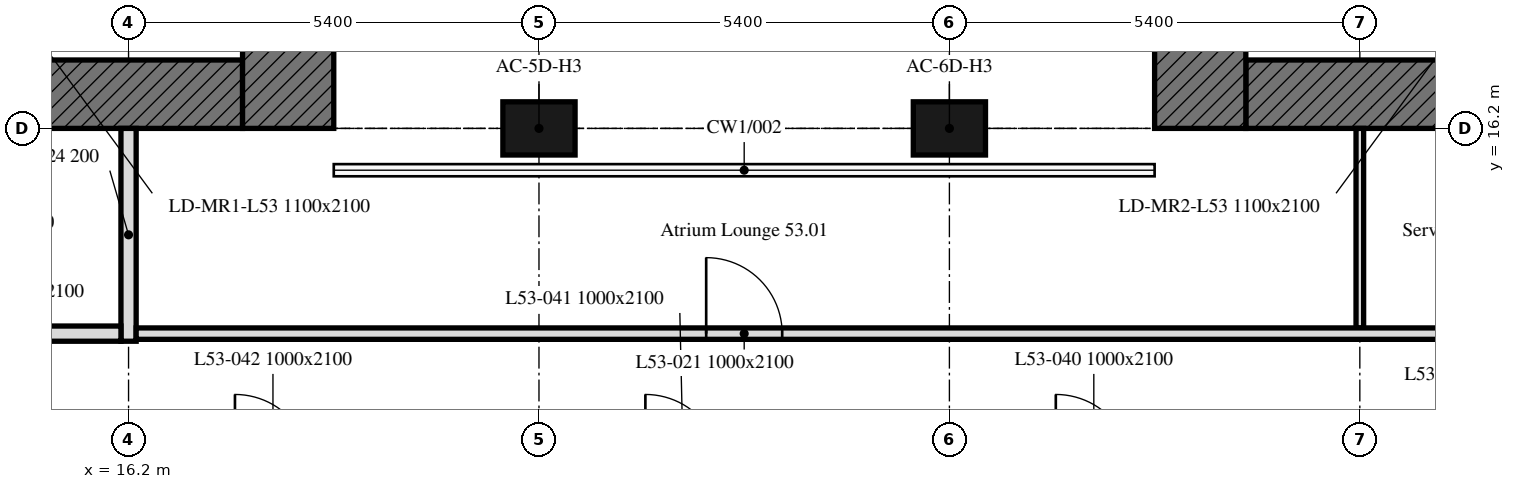
"""IFC4 building model, lengths in metres.
Left out: names, types, materials, properties, quantities, classifications, styles, units other than length and angle.
Written with IfcOpenShell. Run it as: python <this file> out.ifc"""

import sys

from ifc_helpers import new_model, si_unit, direction, frame, frame_2d, origin, origin_2d, place, context, subcontext, project, spatial, rectangle, extrude, element, fill, save


model = new_model("IFC4")
c1 = context("Model", 3, precision=1e-05, world=origin(), true_north=direction((0.0, 1.0)))
c2 = subcontext(c1, "Body", "Model", "MODEL_VIEW")
j1 = project(units=[si_unit("LENGTHUNIT", "METRE"), si_unit("PLANEANGLEUNIT", "RADIAN")], contexts=[c1])
p1 = place(None, origin())
s1 = spatial("IfcSite", under=j1, at=p1, CompositionType="ELEMENT")
p2 = place(p1, origin())
s2 = spatial("IfcBuilding", under=s1, at=p2, CompositionType="ELEMENT")
p3 = place(p2, frame((0.0, 0.0, 213.7)))
s3 = spatial("IfcBuildingStorey", under=s2, at=p3, CompositionType="ELEMENT", Elevation=213.7)
for number, where, z_axis, x_axis in (
    (1, (21.6, 16.2, 0.0), (0.0, 0.0, 1.0), (1.0, 0.0, 0.0)),
    (2, (27.0, 16.2, 0.0), (0.0, 0.0, 1.0), (1.0, 0.0, 0.0)),
):
    element("IfcColumn", number, at=place(p3, frame(where, z_axis=z_axis, x_axis=x_axis)), inside=s3, PredefinedType="COLUMN", context=c2, shape_type="SweptSolid", body=[
        extrude(rectangle(XDim=0.95, YDim=0.7, at=origin_2d()), origin(), (0.0, 0.0, 1.0), 3.0),
    ])
p4 = place(p3, frame((17.7, 16.65, 0.0), z_axis=(0.0, 0.0, 1.0), x_axis=(-1.0, 0.0, 0.0)))
e3 = element("IfcWall", 3, at=p4, inside=s3, PredefinedType="SOLIDWALL", context=c2, shape_type="SweptSolid", body=[
    extrude(rectangle(XDim=11.1, YDim=0.9, at=frame_2d((5.55, 0.0))), origin(), (0.0, 0.0, 1.0), 3.0),
])
p5 = place(p4, frame((5.55, 0.0, 0.0)))
e4 = element("IfcOpeningElement", 4, at=p5, cuts=e3, PredefinedType="OPENING", context=c2, shape_type="SweptSolid", body=[
    extrude(rectangle(XDim=2.0, YDim=2.4, at=frame_2d((1.0, 1.2))), frame((0.0, 0.45, 0.0), z_axis=(0.0, -1.0, 0.0), x_axis=(1.0, 0.0, 0.0)), (0.0, 0.0, 1.0), 0.9),
])
p6 = place(p3, frame((18.3, 32.4, 0.0), z_axis=(0.0, 0.0, 1.0), x_axis=(0.0, -1.0, 0.0)))
e5 = element("IfcWall", 5, at=p6, inside=s3, PredefinedType="SOLIDWALL", context=c2, shape_type="SweptSolid", body=[
    extrude(rectangle(XDim=16.2, YDim=1.2, at=frame_2d((8.1, 0.0))), origin(), (0.0, 0.0, 1.0), 3.0),
])
p7 = place(p3, frame((42.0, 16.65, 0.0), z_axis=(0.0, 0.0, 1.0), x_axis=(-1.0, 0.0, 0.0)))
e6 = element("IfcWall", 6, at=p7, inside=s3, PredefinedType="SOLIDWALL", context=c2, shape_type="SweptSolid", body=[
    extrude(rectangle(XDim=11.1, YDim=0.9, at=frame_2d((5.55, 0.0))), origin(), (0.0, 0.0, 1.0), 3.0),
])
p8 = place(p7, frame((3.55, 0.0, 0.0)))
e7 = element("IfcOpeningElement", 7, at=p8, cuts=e6, PredefinedType="OPENING", context=c2, shape_type="SweptSolid", body=[
    extrude(rectangle(XDim=2.0, YDim=2.4, at=frame_2d((1.0, 1.2))), frame((0.0, 0.45, 0.0), z_axis=(0.0, -1.0, 0.0), x_axis=(1.0, 0.0, 0.0)), (0.0, 0.0, 1.0), 0.9),
])
p9 = place(p3, frame((30.3, 16.2, 0.0), z_axis=(0.0, 0.0, 1.0), x_axis=(0.0, 1.0, 0.0)))
e8 = element("IfcWall", 8, at=p9, inside=s3, PredefinedType="SOLIDWALL", context=c2, shape_type="SweptSolid", body=[
    extrude(rectangle(XDim=16.2, YDim=1.2, at=frame_2d((8.1, 0.0))), origin(), (0.0, 0.0, 1.0), 3.0),
])
p10 = place(p3, frame((32.4, 13.575, 0.0), z_axis=(0.0, 0.0, 1.0), x_axis=(0.0, 1.0, 0.0)))
e9 = element("IfcWall", 9, at=p10, inside=s3, PredefinedType="PARTITIONING", context=c2, shape_type="SweptSolid", body=[
    extrude(rectangle(XDim=2.625, YDim=0.1, at=frame_2d((1.312, 0.0))), origin(), (0.0, 0.0, 1.0), 3.0),
])
p11 = place(p3, frame((16.2, 16.2, 0.0), z_axis=(0.0, 0.0, 1.0), x_axis=(0.0, -1.0, 0.0)))
e10 = element("IfcWall", 10, at=p11, inside=s3, PredefinedType="PARTITIONING", context=c2, shape_type="SweptSolid", body=[
    extrude(rectangle(XDim=2.8, YDim=0.2, at=frame_2d((1.4, 0.0))), origin(), (0.0, 0.0, 1.0), 3.0),
])
p12 = place(p3, frame((16.3, 13.5, 0.0), z_axis=(0.0, 0.0, 1.0), x_axis=(1.0, 0.0, 0.0)))
e11 = element("IfcWall", 11, at=p12, inside=s3, PredefinedType="PARTITIONING", context=c2, shape_type="SweptSolid", body=[
    extrude(rectangle(XDim=26.149, YDim=0.15, at=frame_2d((13.074, 0.0))), origin(), (0.0, 0.0, 1.0), 3.0),
])
p13 = place(p12, frame((7.5, 0.0, 0.0)))
e12 = element("IfcOpeningElement", 12, at=p13, cuts=e11, PredefinedType="OPENING", context=c2, shape_type="SweptSolid", body=[
    extrude(rectangle(XDim=1.0, YDim=2.1, at=frame_2d((0.5, 1.05))), frame((0.0, 0.075, 0.0), z_axis=(0.0, -1.0, 0.0), x_axis=(1.0, 0.0, 0.0)), (0.0, 0.0, 1.0), 0.15),
])
p14 = place(p12, frame((23.12, 0.0, 0.0)))
e13 = element("IfcOpeningElement", 13, at=p14, cuts=e11, PredefinedType="OPENING", context=c2, shape_type="SweptSolid", body=[
    extrude(rectangle(XDim=1.0, YDim=2.1, at=frame_2d((0.5, 1.05))), frame((0.0, 0.075, 0.0), z_axis=(0.0, -1.0, 0.0), x_axis=(1.0, 0.0, 0.0)), (0.0, 0.0, 1.0), 0.15),
])
p15 = place(p12, frame((17.225, 0.0, 0.0)))
e14 = element("IfcOpeningElement", 14, at=p15, cuts=e11, PredefinedType="OPENING", context=c2, shape_type="SweptSolid", body=[
    extrude(rectangle(XDim=1.0, YDim=2.1, at=frame_2d((0.5, 1.05))), frame((0.0, 0.075, 0.0), z_axis=(0.0, -1.0, 0.0), x_axis=(1.0, 0.0, 0.0)), (0.0, 0.0, 1.0), 0.15),
])
p16 = place(p12, frame((19.65, 0.0, 0.0)))
e15 = element("IfcOpeningElement", 15, at=p16, cuts=e11, PredefinedType="OPENING", context=c2, shape_type="SweptSolid", body=[
    extrude(rectangle(XDim=1.8, YDim=2.4, at=frame_2d((0.9, 1.2))), frame((0.0, 0.075, 0.0), z_axis=(0.0, -1.0, 0.0), x_axis=(1.0, 0.0, 0.0)), (0.0, 0.0, 1.0), 0.15),
])
p17 = place(p3, frame((16.1, 13.5, 0.0), z_axis=(0.0, 0.0, 1.0), x_axis=(-1.0, 0.0, 0.0)))
e16 = element("IfcWall", 16, at=p17, inside=s3, PredefinedType="PARTITIONING", context=c2, shape_type="SweptSolid", body=[
    extrude(rectangle(XDim=3.05, YDim=0.2, at=frame_2d((1.525, 0.0))), origin(), (0.0, 0.0, 1.0), 3.0),
])
p18 = place(p17, frame((1.025, 0.0, 0.0)))
e17 = element("IfcOpeningElement", 17, at=p18, cuts=e16, PredefinedType="OPENING", context=c2, shape_type="SweptSolid", body=[
    extrude(rectangle(XDim=1.0, YDim=2.1, at=frame_2d((0.5, 1.05))), frame((0.0, 0.1, 0.0), z_axis=(0.0, -1.0, 0.0), x_axis=(1.0, 0.0, 0.0)), (0.0, 0.0, 1.0), 0.2),
])
p19 = place(p13, origin())
e18 = element("IfcDoor", 18, at=p19, inside=s3, OperationType="SINGLE_SWING_LEFT", PredefinedType="DOOR", context=c2, shape_type="SweptSolid", body=[
    extrude(rectangle(XDim=1.0, YDim=2.1, at=frame_2d((0.5, 1.05))), frame((0.0, 0.025, 0.0), z_axis=(0.0, -1.0, 0.0), x_axis=(1.0, 0.0, 0.0)), (0.0, 0.0, 1.0), 0.05),
])
fill(e12, e18)
save(model, sys.argv[1])
